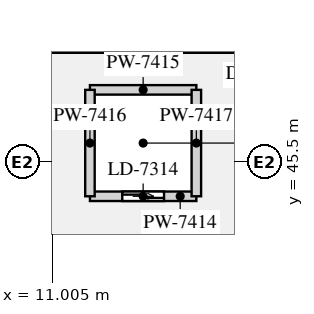
"""IFC4 building model, lengths in metres.
Left out: names, types, materials, properties, quantities, classifications, styles, units other than length and angle.
Written with IfcOpenShell. Run it as: python <this file> out.ifc"""

import sys

from ifc_helpers import new_model, si_unit, direction, frame, frame_2d, origin, place, context, subcontext, project, spatial, rectangle, extrude, element, fill, save


model = new_model("IFC4")
c1 = context("Model", 3, precision=1e-05, world=origin(), true_north=direction((0.0, 1.0)))
c2 = subcontext(c1, "Body", "Model", "MODEL_VIEW")
j1 = project(units=[si_unit("LENGTHUNIT", "METRE"), si_unit("PLANEANGLEUNIT", "RADIAN")], contexts=[c1])
p1 = place(None, origin())
s1 = spatial("IfcSite", under=j1, at=p1, CompositionType="ELEMENT")
p2 = place(p1, origin())
s2 = spatial("IfcBuilding", under=s1, at=p2, CompositionType="ELEMENT")
p3 = place(p2, frame((0.0, 0.0, 6.5)))
s3 = spatial("IfcBuildingStorey", under=s2, at=p3, CompositionType="ELEMENT", Elevation=6.5)
p4 = place(p3, frame((9.0, 48.5, 0.0), z_axis=(0.0, 0.0, 1.0), x_axis=(1.0, 0.0, 0.0)))
e1 = element("IfcWall", 1, at=p4, inside=s3, PredefinedType="PARTITIONING", context=c2, shape_type="SweptSolid", body=[
    extrude(rectangle(XDim=9.0, YDim=0.25, at=frame_2d((4.5, 0.0))), origin(), (0.0, 0.0, 1.0), 4.098),
])
p5 = place(p4, frame((6.85, 0.0, 0.0)))
e2 = element("IfcOpeningElement", 2, at=p5, cuts=e1, PredefinedType="OPENING", context=c2, shape_type="SweptSolid", body=[
    extrude(rectangle(XDim=1.0, YDim=2.1, at=frame_2d((0.5, 1.05))), frame((0.0, 0.135, 0.0), z_axis=(0.0, -1.0, 0.0), x_axis=(1.0, 0.0, 0.0)), (0.0, 0.0, 1.0), 0.27),
])
p6 = place(p3, frame((12.0, 44.6, 0.0), z_axis=(0.0, 0.0, 1.0), x_axis=(1.0, 0.0, 0.0)))
e3 = element("IfcWall", 3, at=p6, inside=s3, PredefinedType="SOLIDWALL", context=c2, shape_type="SweptSolid", body=[
    extrude(rectangle(XDim=2.8, YDim=0.25, at=frame_2d((1.4, 0.0))), origin(), (0.0, 0.0, 1.0), 4.098),
])
p7 = place(p6, frame((0.85, 0.0, 0.0)))
e4 = element("IfcOpeningElement", 4, at=p7, cuts=e3, PredefinedType="OPENING", context=c2, shape_type="SweptSolid", body=[
    extrude(rectangle(XDim=1.1, YDim=2.1, at=frame_2d((0.55, 1.05))), frame((0.0, 0.135, 0.0), z_axis=(0.0, -1.0, 0.0), x_axis=(1.0, 0.0, 0.0)), (0.0, 0.0, 1.0), 0.27),
])
p8 = place(p3, frame((12.0, 47.4, 0.0), z_axis=(0.0, 0.0, 1.0), x_axis=(1.0, 0.0, 0.0)))
e5 = element("IfcWall", 5, at=p8, inside=s3, PredefinedType="SOLIDWALL", context=c2, shape_type="SweptSolid", body=[
    extrude(rectangle(XDim=2.8, YDim=0.25, at=frame_2d((1.4, 0.0))), origin(), (0.0, 0.0, 1.0), 4.098),
])
for number, where, z_axis, x_axis in (
    (6, (12.0, 44.6, 0.0), (0.0, 0.0, 1.0), (0.0, 1.0, 0.0)),
    (7, (14.8, 44.6, 0.0), (0.0, 0.0, 1.0), (0.0, 1.0, 0.0)),
):
    element("IfcWall", number, at=place(p3, frame(where, z_axis=z_axis, x_axis=x_axis)), inside=s3, PredefinedType="SOLIDWALL", context=c2, shape_type="SweptSolid", body=[
        extrude(rectangle(XDim=2.8, YDim=0.25, at=frame_2d((1.4, 0.0))), origin(), (0.0, 0.0, 1.0), 4.098),
    ])
p9 = place(p7, origin())
e8 = element("IfcDoor", 8, at=p9, inside=s3, OperationType="SLIDING_TO_LEFT", PredefinedType="DOOR", context=c2, shape_type="SweptSolid", body=[
    extrude(rectangle(XDim=1.1, YDim=2.1, at=frame_2d((0.55, 1.05))), frame((0.0, 0.025, 0.0), z_axis=(0.0, -1.0, 0.0), x_axis=(1.0, 0.0, 0.0)), (0.0, 0.0, 1.0), 0.05),
])
fill(e4, e8)
save(model, sys.argv[1])
